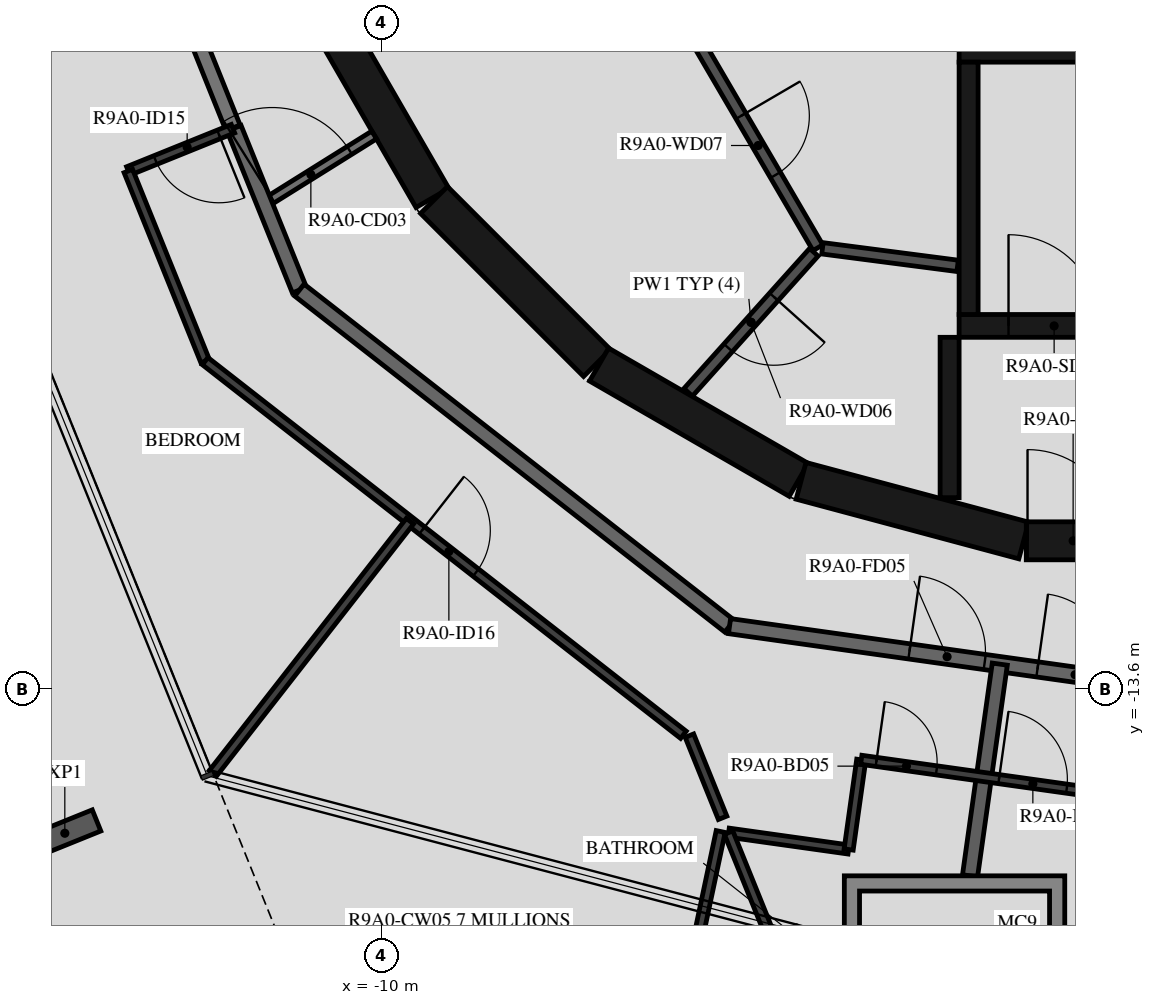
"""IFC4 building model, lengths in metres.
Left out: names, types, materials, properties, quantities, classifications, styles, units other than length and angle.
Written with IfcOpenShell. Run it as: python <this file> out.ifc"""

import sys

from ifc_helpers import new_model, si_unit, direction, frame, frame_2d, origin, origin_2d, place, context, subcontext, project, spatial, polyline, rectangle, i_section, outline, extrude, element, fill, save


model = new_model("IFC4")
c1 = context("Model", 3, precision=1e-05, world=origin(), true_north=direction((0.0, 1.0)))
c2 = subcontext(c1, "Body", "Model", "MODEL_VIEW")
j1 = project(units=[si_unit("LENGTHUNIT", "METRE"), si_unit("PLANEANGLEUNIT", "RADIAN")], contexts=[c1])
p1 = place(None, origin())
s1 = spatial("IfcSite", under=j1, at=p1, CompositionType="ELEMENT")
p2 = place(p1, origin())
s2 = spatial("IfcBuilding", under=s1, at=p2, CompositionType="ELEMENT")
p3 = place(p2, frame((0.0, 0.0, 333.0)))
s3 = spatial("IfcBuildingStorey", under=s2, at=p3, CompositionType="ELEMENT", Elevation=333.0)
p4 = place(p3, frame((-14.166, -15.495, -0.45), z_axis=(0.0, 0.0, 1.0), x_axis=(-0.374606892434, 0.927183733755, 0.0)))
e1 = element("IfcColumn", 1, at=p4, inside=s3, PredefinedType="COLUMN", context=c2, shape_type="SweptSolid", body=[
    extrude(i_section(OverallWidth=0.3, OverallDepth=0.9, WebThickness=0.019, FlangeThickness=0.035, FilletRadius=0.03, at=origin_2d()), origin(), (0.0, 0.0, 1.0), 3.57),
])
p5 = place(p3, frame((-10.845, -4.51, 0.0), z_axis=(0.0, 0.0, 1.0), x_axis=(0.500087131594, -0.865975092491, 0.0)))
e2 = element("IfcWall", 2, at=p5, inside=s3, PredefinedType="SHEAR", context=c2, shape_type="SweptSolid", body=[
    extrude(rectangle(XDim=3.033, YDim=0.5, at=frame_2d((1.516, 0.0))), origin(), (0.0, 0.0, 1.0), 3.12),
])
p6 = place(p3, frame((-9.308, -7.164, 0.0), z_axis=(0.0, 0.0, 1.0), x_axis=(0.707106781187, -0.707106781187, 0.0)))
e3 = element("IfcWall", 3, at=p6, inside=s3, PredefinedType="SHEAR", context=c2, shape_type="SweptSolid", body=[
    extrude(rectangle(XDim=3.032, YDim=0.5, at=frame_2d((1.516, 0.0))), origin(), (0.0, 0.0, 1.0), 3.12),
])
for number, where, z_axis, x_axis in (
    (4, (-7.137, -9.329, 0.0), (0.0, 0.0, 1.0), (0.866, -0.5, 0.0)),
    (5, (-4.479, -10.858, 0.0), (0.0, 0.0, 1.0), (0.966, -0.259, 0.0)),
):
    element("IfcWall", number, at=place(p3, frame(where, z_axis=z_axis, x_axis=x_axis)), inside=s3, PredefinedType="SHEAR", context=c2, shape_type="SweptSolid", body=[
        extrude(rectangle(XDim=3.033, YDim=0.5, at=frame_2d((1.516, 0.0))), origin(), (0.0, 0.0, 1.0), 3.12),
    ])
p7 = place(p3, frame((-1.516, -11.647, 0.0), z_axis=(0.0, 0.0, 1.0), x_axis=(1.0, 0.0, 0.0)))
e6 = element("IfcWall", 6, at=p7, inside=s3, PredefinedType="SHEAR", context=c2, shape_type="SweptSolid", body=[
    extrude(rectangle(XDim=3.033, YDim=0.5, at=frame_2d((1.516, 0.0))), origin(), (0.0, 0.0, 1.0), 3.12),
])
p8 = place(p7, frame((0.016, 0.0, 0.0)))
e7 = element("IfcOpeningElement", 7, at=p8, cuts=e6, PredefinedType="OPENING", context=c2, shape_type="SweptSolid", body=[
    extrude(rectangle(XDim=1.2, YDim=2.1, at=frame_2d((0.6, 1.05))), frame((0.0, 0.26, 0.0), z_axis=(0.0, -1.0, 0.0), x_axis=(1.0, 0.0, 0.0)), (0.0, 0.0, 1.0), 0.52),
])
p9 = place(p3, frame((-2.275, -8.67, 0.0), z_axis=(0.0, 0.0, 1.0), x_axis=(0.0, 1.0, 0.0)))
e8 = element("IfcWall", 8, at=p9, inside=s3, PredefinedType="SHEAR", context=c2, shape_type="SweptSolid", body=[
    extrude(rectangle(XDim=3.32, YDim=0.25, at=frame_2d((1.66, 0.0))), origin(), (0.0, 0.0, 1.0), 3.12),
])
p10 = place(p3, frame((-2.4, -5.2, 0.0), z_axis=(0.0, 0.0, 1.0), x_axis=(1.0, 0.0, 0.0)))
e9 = element("IfcWall", 9, at=p10, inside=s3, PredefinedType="SHEAR", context=c2, shape_type="SweptSolid", body=[
    extrude(rectangle(XDim=7.05, YDim=0.3, at=frame_2d((3.525, 0.0))), origin(), (0.0, 0.0, 1.0), 3.12),
])
p11 = place(p3, frame((-2.4, -8.82, 0.0), z_axis=(0.0, 0.0, 1.0), x_axis=(1.0, 0.0, 0.0)))
e10 = element("IfcWall", 10, at=p11, inside=s3, PredefinedType="SHEAR", context=c2, shape_type="SweptSolid", body=[
    extrude(rectangle(XDim=2.5, YDim=0.3, at=frame_2d((1.25, 0.0))), origin(), (0.0, 0.0, 1.0), 3.12),
])
p12 = place(p11, frame((0.65, 0.0, 0.0)))
e11 = element("IfcOpeningElement", 11, at=p12, cuts=e10, PredefinedType="OPENING", context=c2, shape_type="SweptSolid", body=[
    extrude(rectangle(XDim=1.2, YDim=2.1, at=frame_2d((0.6, 1.05))), frame((0.0, 0.16, 0.0), z_axis=(0.0, -1.0, 0.0), x_axis=(1.0, 0.0, 0.0)), (0.0, 0.0, 1.0), 0.32),
])
p13 = place(p3, frame((-2.525, -8.97, 0.0), z_axis=(0.0, 0.0, 1.0), x_axis=(0.0, -1.0, 0.0)))
e12 = element("IfcWall", 12, at=p13, inside=s3, PredefinedType="SHEAR", context=c2, shape_type="SweptSolid", body=[
    extrude(rectangle(XDim=2.11, YDim=0.25, at=frame_2d((1.055, 0.0))), origin(), (0.0, 0.0, 1.0), 3.12),
])
p14 = place(p3, frame((-5.829, -5.102, 0.0), z_axis=(0.0, 0.0, 1.0), x_axis=(0.504480008384, -0.863423373057, 0.0)))
e13 = element("IfcWall", 13, at=p14, inside=s3, PredefinedType="PARTITIONING", context=c2, shape_type="SweptSolid", body=[
    extrude(rectangle(XDim=3.115, YDim=0.15, at=frame_2d((1.558, 0.0))), origin(), (0.0, 0.0, 1.0), 3.12),
])
p15 = place(p14, frame((1.107, 0.0, 0.0)))
e14 = element("IfcOpeningElement", 14, at=p15, cuts=e13, PredefinedType="OPENING", context=c2, shape_type="SweptSolid", body=[
    extrude(rectangle(XDim=0.9, YDim=2.1, at=frame_2d((0.45, 1.05))), frame((0.0, 0.085, 0.0), z_axis=(0.0, -1.0, 0.0), x_axis=(1.0, 0.0, 0.0)), (0.0, 0.0, 1.0), 0.17),
])
p16 = place(p3, frame((-4.311, -7.851, 0.0), z_axis=(0.0, 0.0, 1.0), x_axis=(-0.667869133096, -0.744278725383, 0.0)))
e15 = element("IfcWall", 15, at=p16, inside=s3, PredefinedType="PARTITIONING", context=c2, shape_type="SweptSolid", body=[
    extrude(rectangle(XDim=2.476, YDim=0.15, at=frame_2d((1.238, 0.0))), origin(), (0.0, 0.0, 1.0), 3.12),
])
p17 = place(p16, frame((0.788, 0.0, 0.0)))
e16 = element("IfcOpeningElement", 16, at=p17, cuts=e15, PredefinedType="OPENING", context=c2, shape_type="SweptSolid", body=[
    extrude(rectangle(XDim=0.9, YDim=2.1, at=frame_2d((0.45, 1.05))), frame((0.0, 0.085, 0.0), z_axis=(0.0, -1.0, 0.0), x_axis=(1.0, 0.0, 0.0)), (0.0, 0.0, 1.0), 0.17),
])
p18 = place(p3, frame((-4.198, -7.799, 0.0), z_axis=(0.0, 0.0, 1.0), x_axis=(0.991686747293, -0.128675542523, 0.0)))
e17 = element("IfcWall", 17, at=p18, inside=s3, PredefinedType="PARTITIONING", context=c2, shape_type="SweptSolid", body=[
    extrude(rectangle(XDim=1.793, YDim=0.15, at=frame_2d((0.896, 0.0))), origin(), (0.0, 0.0, 1.0), 3.12),
])
p19 = place(p3, frame((-11.539, -7.21, 0.0), z_axis=(0.0, 0.0, 1.0), x_axis=(0.848103039868, 0.529831325769, 0.0)))
e18 = element("IfcWall", 18, at=p19, inside=s3, PredefinedType="PARTITIONING", context=c2, shape_type="SweptSolid", body=[
    extrude(rectangle(XDim=1.702, YDim=0.12, at=frame_2d((0.851, 0.0))), origin(), (0.0, 0.0, 1.0), 3.12),
])
p20 = place(p19, frame((0.12, 0.0, 0.0)))
e19 = element("IfcOpeningElement", 19, at=p20, cuts=e18, PredefinedType="OPENING", context=c2, shape_type="SweptSolid", body=[
    extrude(rectangle(XDim=1.2, YDim=2.1, at=frame_2d((0.6, 1.05))), frame((0.0, 0.07, 0.0), z_axis=(0.0, -1.0, 0.0), x_axis=(1.0, 0.0, 0.0)), (0.0, 0.0, 1.0), 0.14),
])
p21 = place(p3, frame((-13.769, -1.691, 0.0), z_axis=(0.0, 0.0, 1.0), x_axis=(0.372720094028, -0.927943819155, 0.0)))
e20 = element("IfcWall", 20, at=p21, inside=s3, PredefinedType="STANDARD", context=c2, shape_type="SweptSolid", body=[
    extrude(rectangle(XDim=4.875, YDim=0.2, at=frame_2d((2.438, 0.0))), origin(), (0.0, 0.0, 1.0), 3.12),
])
p22 = place(p3, frame((-11.939, -6.22, 0.0), z_axis=(0.0, 0.0, 1.0), x_axis=(0.374651128394, -0.927165860024, 0.0)))
e21 = element("IfcWall", 21, at=p22, inside=s3, PredefinedType="STANDARD", context=c2, shape_type="SweptSolid", body=[
    extrude(rectangle(XDim=2.296, YDim=0.2, at=frame_2d((1.148, 0.0))), origin(), (0.0, 0.0, 1.0), 3.12),
])
p23 = place(p3, frame((-11.079, -8.349, 0.0), z_axis=(0.0, 0.0, 1.0), x_axis=(0.78800478687, -0.615669112324, 0.0)))
e22 = element("IfcWall", 22, at=p23, inside=s3, PredefinedType="STANDARD", context=c2, shape_type="SweptSolid", body=[
    extrude(rectangle(XDim=7.181, YDim=0.2, at=frame_2d((3.591, 0.0))), origin(), (0.0, 0.0, 1.0), 3.12),
])
p24 = place(p3, frame((-5.42, -12.77, 0.0), z_axis=(0.0, 0.0, 1.0), x_axis=(0.990270565508, -0.139155334385, 0.0)))
e23 = element("IfcWall", 23, at=p24, inside=s3, PredefinedType="STANDARD", context=c2, shape_type="SweptSolid", body=[
    extrude(rectangle(XDim=7.181, YDim=0.2, at=frame_2d((3.59, 0.0))), origin(), (0.0, 0.0, 1.0), 3.12),
])
p25 = place(p24, frame((2.39, 0.0, 0.0)))
e24 = element("IfcOpeningElement", 24, at=p25, cuts=e23, PredefinedType="OPENING", context=c2, shape_type="SweptSolid", body=[
    extrude(rectangle(XDim=1.0, YDim=2.1, at=frame_2d((0.5, 1.05))), frame((0.0, 0.11, 0.0), z_axis=(0.0, -1.0, 0.0), x_axis=(1.0, 0.0, 0.0)), (0.0, 0.0, 1.0), 0.22),
])
p26 = place(p24, frame((4.091, 0.0, 0.0)))
e25 = element("IfcOpeningElement", 25, at=p26, cuts=e23, PredefinedType="OPENING", context=c2, shape_type="SweptSolid", body=[
    extrude(rectangle(XDim=1.0, YDim=2.1, at=frame_2d((0.5, 1.05))), frame((0.0, 0.11, 0.0), z_axis=(0.0, -1.0, 0.0), x_axis=(1.0, 0.0, 0.0)), (0.0, 0.0, 1.0), 0.22),
])
p27 = place(p3, frame((-2.256, -16.055, 0.0), z_axis=(0.0, 0.0, 1.0), x_axis=(0.139148428478, 0.990271535919, 0.0)))
e26 = element("IfcWall", 26, at=p27, inside=s3, PredefinedType="STANDARD", context=c2, shape_type="SweptSolid", body=[
    extrude(rectangle(XDim=2.812, YDim=0.2, at=frame_2d((1.406, 0.0))), origin(), (0.0, 0.0, 1.0), 3.12),
])
p28 = place(p3, frame((-11.953, -6.225, 0.0), z_axis=(0.0, 0.0, 1.0), x_axis=(-0.927144096717, -0.374704982518, 0.0)))
e27 = element("IfcWall", 27, at=p28, inside=s3, PredefinedType="PARTITIONING", context=c2, shape_type="SweptSolid", body=[
    extrude(rectangle(XDim=1.485, YDim=0.12, at=frame_2d((0.742, 0.0))), origin(), (0.0, 0.0, 1.0), 3.12),
])
p29 = place(p28, frame((0.2, 0.0, 0.0)))
e28 = element("IfcOpeningElement", 28, at=p29, cuts=e27, PredefinedType="OPENING", context=c2, shape_type="SweptSolid", body=[
    extrude(rectangle(XDim=0.9, YDim=2.1, at=frame_2d((0.45, 1.05))), frame((0.0, 0.07, 0.0), z_axis=(0.0, -1.0, 0.0), x_axis=(1.0, 0.0, 0.0)), (0.0, 0.0, 1.0), 0.14),
])
p30 = place(p3, frame((-13.33, -6.782, 0.0), z_axis=(0.0, 0.0, 1.0), x_axis=(0.374602180132, -0.927185637637, 0.0)))
e29 = element("IfcWall", 29, at=p30, inside=s3, PredefinedType="PARTITIONING", context=c2, shape_type="SweptSolid", body=[
    extrude(rectangle(XDim=2.698, YDim=0.12, at=frame_2d((1.349, 0.0))), origin(), (0.0, 0.0, 1.0), 3.12),
])
p31 = place(p3, frame((-12.319, -9.283, 0.0), z_axis=(0.0, 0.0, 1.0), x_axis=(0.788000268464, -0.61567489546, 0.0)))
e30 = element("IfcWall", 30, at=p31, inside=s3, PredefinedType="PARTITIONING", context=c2, shape_type="SweptSolid", body=[
    extrude(rectangle(XDim=7.985, YDim=0.12, at=frame_2d((3.992, 0.0))), origin(), (0.0, 0.0, 1.0), 3.12),
])
p32 = place(p31, frame((3.619, 0.0, 0.0)))
e31 = element("IfcOpeningElement", 31, at=p32, cuts=e30, PredefinedType="OPENING", context=c2, shape_type="SweptSolid", body=[
    extrude(rectangle(XDim=0.9, YDim=2.1, at=frame_2d((0.45, 1.05))), frame((0.0, 0.07, 0.0), z_axis=(0.0, -1.0, 0.0), x_axis=(1.0, 0.0, 0.0)), (0.0, 0.0, 1.0), 0.14),
])
p33 = place(p3, frame((-5.948, -14.21, 0.0), z_axis=(0.0, 0.0, 1.0), x_axis=(0.374601530156, -0.927185900241, 0.0)))
e32 = element("IfcWall", 32, at=p33, inside=s3, PredefinedType="PARTITIONING", context=c2, shape_type="SweptSolid", body=[
    extrude(rectangle(XDim=1.166, YDim=0.12, at=frame_2d((0.583, 0.0))), origin(), (0.0, 0.0, 1.0), 3.12),
])
p34 = place(p3, frame((-5.433, -15.487, 0.0), z_axis=(0.0, 0.0, 1.0), x_axis=(0.990268451053, -0.139170380644, 0.0)))
e33 = element("IfcWall", 33, at=p34, inside=s3, PredefinedType="PARTITIONING", context=c2, shape_type="SweptSolid", body=[
    extrude(rectangle(XDim=1.595, YDim=0.12, at=frame_2d((0.797, 0.0))), origin(), (0.0, 0.0, 1.0), 3.12),
])
p35 = place(p3, frame((-3.854, -15.708, 0.0), z_axis=(0.0, 0.0, 1.0), x_axis=(0.139298773474, 0.99025039849, 0.0)))
e34 = element("IfcWall", 34, at=p35, inside=s3, PredefinedType="PARTITIONING", context=c2, shape_type="SweptSolid", body=[
    extrude(rectangle(XDim=1.192, YDim=0.12, at=frame_2d((0.596, 0.0))), origin(), (0.0, 0.0, 1.0), 3.12),
])
p36 = place(p3, frame((-3.688, -14.528, 0.0), z_axis=(0.0, 0.0, 1.0), x_axis=(0.990273698817, -0.139133035013, 0.0)))
e35 = element("IfcWall", 35, at=p36, inside=s3, PredefinedType="PARTITIONING", context=c2, shape_type="SweptSolid", body=[
    extrude(rectangle(XDim=4.945, YDim=0.12, at=frame_2d((2.472, 0.0))), origin(), (0.0, 0.0, 1.0), 3.12),
])
p37 = place(p36, frame((0.2, 0.0, 0.0)))
e36 = element("IfcOpeningElement", 36, at=p37, cuts=e35, PredefinedType="OPENING", context=c2, shape_type="SweptSolid", body=[
    extrude(rectangle(XDim=0.8, YDim=2.1, at=frame_2d((0.4, 1.05))), frame((0.0, 0.07, 0.0), z_axis=(0.0, -1.0, 0.0), x_axis=(1.0, 0.0, 0.0)), (0.0, 0.0, 1.0), 0.14),
])
p38 = place(p36, frame((1.83, 0.0, 0.0)))
e37 = element("IfcOpeningElement", 37, at=p38, cuts=e35, PredefinedType="OPENING", context=c2, shape_type="SweptSolid", body=[
    extrude(rectangle(XDim=0.9, YDim=2.1, at=frame_2d((0.45, 1.05))), frame((0.0, 0.07, 0.0), z_axis=(0.0, -1.0, 0.0), x_axis=(1.0, 0.0, 0.0)), (0.0, 0.0, 1.0), 0.14),
])
p39 = place(p3, frame((-12.219, -14.708, 0.0), z_axis=(0.0, 0.0, 1.0), x_axis=(0.615656413137, 0.788014708596, 0.0)))
e38 = element("IfcWall", 38, at=p39, inside=s3, PredefinedType="PARTITIONING", context=c2, shape_type="SweptSolid", body=[
    extrude(rectangle(XDim=4.213, YDim=0.12, at=frame_2d((2.106, 0.0))), origin(), (0.0, 0.0, 1.0), 3.12),
])
p40 = place(p3, frame((-7.305, -23.815, 0.0), z_axis=(0.0, 0.0, 1.0), x_axis=(0.207366409306, 0.978263345062, 0.0)))
e39 = element("IfcWall", 39, at=p40, inside=s3, PredefinedType="PARTITIONING", context=c2, shape_type="SweptSolid", body=[
    extrude(rectangle(XDim=8.529, YDim=0.12, at=frame_2d((4.264, 0.0))), origin(), (0.0, 0.0, 1.0), 3.12),
])
p41 = place(p40, frame((0.4, 0.0, 0.0)))
e40 = element("IfcOpeningElement", 40, at=p41, cuts=e39, PredefinedType="OPENING", context=c2, shape_type="SweptSolid", body=[
    extrude(rectangle(XDim=0.9, YDim=2.1, at=frame_2d((0.45, 1.05))), frame((0.0, 0.07, 0.0), z_axis=(0.0, -1.0, 0.0), x_axis=(1.0, 0.0, 0.0)), (0.0, 0.0, 1.0), 0.14),
])
p42 = place(p3, frame((-4.445, -17.93, 0.0), z_axis=(0.0, 0.0, 1.0), x_axis=(-0.374614676827, 0.927180588616, 0.0)))
e41 = element("IfcWall", 41, at=p42, inside=s3, PredefinedType="PARTITIONING", context=c2, shape_type="SweptSolid", body=[
    extrude(rectangle(XDim=2.635, YDim=0.12, at=frame_2d((1.318, 0.0))), origin(), (0.0, 0.0, 1.0), 3.12),
])
p43 = place(p3, origin())
e42 = element("IfcWall", 42, at=p43, inside=s3, PredefinedType="STANDARD", context=c2, shape_type="SweptSolid", body=[
    extrude(outline(polyline([(-1.01, -16.055), (-1.01, -18.955), (-3.91, -18.955), (-3.91, -16.055), (-1.01, -16.055)]), holes=[polyline([(-3.71, -18.755), (-1.21, -18.755), (-1.21, -16.255), (-3.71, -16.255), (-3.71, -18.755)])]), origin(), (0.0, 0.0, 1.0), 3.12),
])
p44 = place(p12, origin())
e43 = element("IfcDoor", 43, at=p44, inside=s3, OperationType="SINGLE_SWING_LEFT", PredefinedType="DOOR", context=c2, shape_type="SweptSolid", body=[
    extrude(rectangle(XDim=1.2, YDim=2.1, at=frame_2d((0.6, 1.05))), frame((0.0, 0.025, 0.0), z_axis=(0.0, -1.0, 0.0), x_axis=(1.0, 0.0, 0.0)), (0.0, 0.0, 1.0), 0.05),
])
fill(e11, e43)
p45 = place(p8, origin())
e44 = element("IfcDoor", 44, at=p45, inside=s3, OperationType="SINGLE_SWING_RIGHT", PredefinedType="DOOR", context=c2, shape_type="SweptSolid", body=[
    extrude(rectangle(XDim=1.2, YDim=2.1, at=frame_2d((0.6, 1.05))), frame((0.0, 0.025, 0.0), z_axis=(0.0, -1.0, 0.0), x_axis=(1.0, 0.0, 0.0)), (0.0, 0.0, 1.0), 0.05),
])
fill(e7, e44)
p46 = place(p17, origin())
e45 = element("IfcDoor", 45, at=p46, inside=s3, OperationType="SINGLE_SWING_RIGHT", PredefinedType="DOOR", context=c2, shape_type="SweptSolid", body=[
    extrude(rectangle(XDim=0.9, YDim=2.1, at=frame_2d((0.45, 1.05))), frame((0.0, 0.025, 0.0), z_axis=(0.0, -1.0, 0.0), x_axis=(1.0, 0.0, 0.0)), (0.0, 0.0, 1.0), 0.05),
])
fill(e16, e45)
p47 = place(p15, origin())
e46 = element("IfcDoor", 46, at=p47, inside=s3, OperationType="SINGLE_SWING_LEFT", PredefinedType="DOOR", context=c2, shape_type="SweptSolid", body=[
    extrude(rectangle(XDim=0.9, YDim=2.1, at=frame_2d((0.45, 1.05))), frame((0.0, 0.025, 0.0), z_axis=(0.0, -1.0, 0.0), x_axis=(1.0, 0.0, 0.0)), (0.0, 0.0, 1.0), 0.05),
])
fill(e14, e46)
p48 = place(p25, origin())
e47 = element("IfcDoor", 47, at=p48, inside=s3, OperationType="SINGLE_SWING_RIGHT", PredefinedType="DOOR", context=c2, shape_type="SweptSolid", body=[
    extrude(rectangle(XDim=1.0, YDim=2.1, at=frame_2d((0.5, 1.05))), frame((0.0, 0.025, 0.0), z_axis=(0.0, -1.0, 0.0), x_axis=(1.0, 0.0, 0.0)), (0.0, 0.0, 1.0), 0.05),
])
fill(e24, e47)
p49 = place(p29, origin())
e48 = element("IfcDoor", 48, at=p49, inside=s3, OperationType="SINGLE_SWING_LEFT", PredefinedType="DOOR", context=c2, shape_type="SweptSolid", body=[
    extrude(rectangle(XDim=0.9, YDim=2.1, at=frame_2d((0.45, 1.05))), frame((0.0, 0.025, 0.0), z_axis=(0.0, -1.0, 0.0), x_axis=(1.0, 0.0, 0.0)), (0.0, 0.0, 1.0), 0.05),
])
fill(e28, e48)
p50 = place(p32, origin())
e49 = element("IfcDoor", 49, at=p50, inside=s3, OperationType="SINGLE_SWING_RIGHT", PredefinedType="DOOR", context=c2, shape_type="SweptSolid", body=[
    extrude(rectangle(XDim=0.9, YDim=2.1, at=frame_2d((0.45, 1.05))), frame((0.0, 0.025, 0.0), z_axis=(0.0, -1.0, 0.0), x_axis=(1.0, 0.0, 0.0)), (0.0, 0.0, 1.0), 0.05),
])
fill(e31, e49)
p51 = place(p37, origin())
e50 = element("IfcDoor", 50, at=p51, inside=s3, OperationType="SINGLE_SWING_RIGHT", PredefinedType="DOOR", context=c2, shape_type="SweptSolid", body=[
    extrude(rectangle(XDim=0.8, YDim=2.1, at=frame_2d((0.4, 1.05))), frame((0.0, 0.025, 0.0), z_axis=(0.0, -1.0, 0.0), x_axis=(1.0, 0.0, 0.0)), (0.0, 0.0, 1.0), 0.05),
])
fill(e36, e50)
p52 = place(p26, origin())
e51 = element("IfcDoor", 51, at=p52, inside=s3, OperationType="SINGLE_SWING_RIGHT", PredefinedType="DOOR", context=c2, shape_type="SweptSolid", body=[
    extrude(rectangle(XDim=1.0, YDim=2.1, at=frame_2d((0.5, 1.05))), frame((0.0, 0.025, 0.0), z_axis=(0.0, -1.0, 0.0), x_axis=(1.0, 0.0, 0.0)), (0.0, 0.0, 1.0), 0.05),
])
fill(e25, e51)
p53 = place(p38, origin())
e52 = element("IfcDoor", 52, at=p53, inside=s3, OperationType="SINGLE_SWING_RIGHT", PredefinedType="DOOR", context=c2, shape_type="SweptSolid", body=[
    extrude(rectangle(XDim=0.9, YDim=2.1, at=frame_2d((0.45, 1.05))), frame((0.0, 0.025, 0.0), z_axis=(0.0, -1.0, 0.0), x_axis=(1.0, 0.0, 0.0)), (0.0, 0.0, 1.0), 0.05),
])
fill(e37, e52)
p54 = place(p20, origin())
e53 = element("IfcDoor", 53, at=p54, inside=s3, OperationType="DOUBLE_DOOR_SINGLE_SWING", PredefinedType="DOOR", context=c2, shape_type="SweptSolid", body=[
    extrude(rectangle(XDim=1.2, YDim=2.1, at=frame_2d((0.6, 1.05))), frame((0.0, 0.025, 0.0), z_axis=(0.0, -1.0, 0.0), x_axis=(1.0, 0.0, 0.0)), (0.0, 0.0, 1.0), 0.05),
])
fill(e19, e53)
save(model, sys.argv[1])
